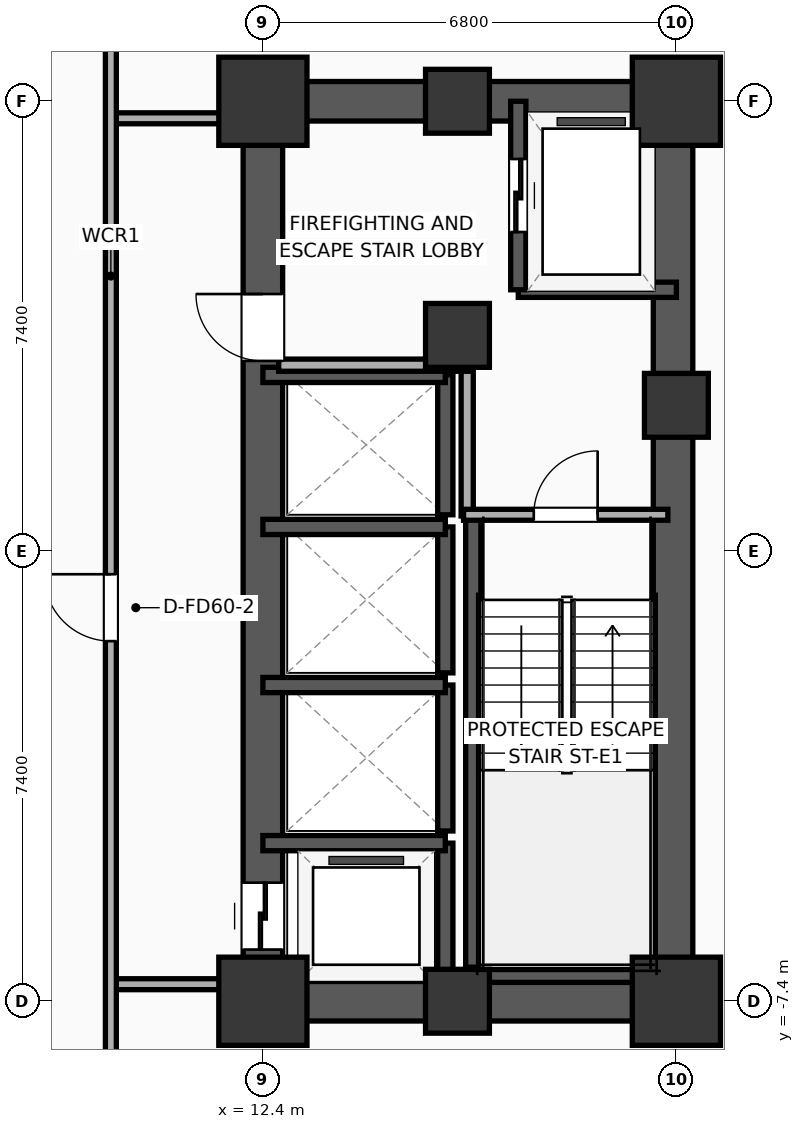
"""IFC4 building model, lengths in metres.
Left out: names, types, materials, properties, quantities, classifications, styles, units other than length and angle.
Written with IfcOpenShell. Run it as: python <this file> out.ifc"""

import sys

from ifc_helpers import new_model, si_unit, direction, frame, frame_2d, origin, origin_2d, place, context, subcontext, project, spatial, rectangle, extrude, element, fill, save


model = new_model("IFC4")
c1 = context("Model", 3, precision=1e-05, world=origin(), true_north=direction((0.0, 1.0)))
c2 = subcontext(c1, "Body", "Model", "MODEL_VIEW")
j1 = project(units=[si_unit("LENGTHUNIT", "METRE"), si_unit("PLANEANGLEUNIT", "RADIAN")], contexts=[c1])
p1 = place(None, origin())
s1 = spatial("IfcSite", under=j1, at=p1, CompositionType="ELEMENT")
p2 = place(p1, origin())
s2 = spatial("IfcBuilding", under=s1, at=p2, CompositionType="ELEMENT")
p3 = place(p2, frame((0.0, 0.0, 29.9)))
s3 = spatial("IfcBuildingStorey", under=s2, at=p3, CompositionType="ELEMENT", Elevation=29.9)
p4 = place(p3, frame((12.4, -7.4, 0.0), z_axis=(0.0, 0.0, 1.0), x_axis=(1.0, 0.0, 0.0)))
e1 = element("IfcColumn", 1, at=p4, inside=s3, PredefinedType="COLUMN", context=c2, shape_type="SweptSolid", body=[
    extrude(rectangle(XDim=1.45, YDim=1.45, at=origin_2d()), origin(), (0.0, 0.0, 1.0), 3.9),
])
p5 = place(p3, frame((15.6, 3.55, 0.0), z_axis=(0.0, 0.0, 1.0), x_axis=(1.0, 0.0, 0.0)))
e2 = element("IfcColumn", 2, at=p5, inside=s3, PredefinedType="COLUMN", context=c2, shape_type="SweptSolid", body=[
    extrude(rectangle(XDim=1.05, YDim=1.05, at=origin_2d()), origin(), (0.0, 0.0, 1.0), 3.9),
])
p6 = place(p3, frame((12.4, 7.4, 0.0), z_axis=(0.0, 0.0, 1.0), x_axis=(1.0, 0.0, 0.0)))
e3 = element("IfcColumn", 3, at=p6, inside=s3, PredefinedType="COLUMN", context=c2, shape_type="SweptSolid", body=[
    extrude(rectangle(XDim=1.45, YDim=1.45, at=origin_2d()), origin(), (0.0, 0.0, 1.0), 3.9),
])
for number, where, z_axis, x_axis in (
    (4, (15.6, -7.4, 0.0), (0.0, 0.0, 1.0), (1.0, 0.0, 0.0)),
    (5, (15.6, 7.4, 0.0), (0.0, 0.0, 1.0), (1.0, 0.0, 0.0)),
):
    element("IfcColumn", number, at=place(p3, frame(where, z_axis=z_axis, x_axis=x_axis)), inside=s3, PredefinedType="COLUMN", context=c2, shape_type="SweptSolid", body=[
        extrude(rectangle(XDim=1.05, YDim=1.05, at=origin_2d()), origin(), (0.0, 0.0, 1.0), 3.9),
    ])
p7 = place(p3, frame((19.2, -7.4, 0.0), z_axis=(0.0, 0.0, 1.0), x_axis=(1.0, 0.0, 0.0)))
e6 = element("IfcColumn", 6, at=p7, inside=s3, PredefinedType="COLUMN", context=c2, shape_type="SweptSolid", body=[
    extrude(rectangle(XDim=1.45, YDim=1.45, at=origin_2d()), origin(), (0.0, 0.0, 1.0), 3.9),
])
p8 = place(p3, frame((19.2, 2.4, 0.0), z_axis=(0.0, 0.0, 1.0), x_axis=(1.0, 0.0, 0.0)))
e7 = element("IfcColumn", 7, at=p8, inside=s3, PredefinedType="COLUMN", context=c2, shape_type="SweptSolid", body=[
    extrude(rectangle(XDim=1.05, YDim=1.05, at=origin_2d()), origin(), (0.0, 0.0, 1.0), 3.9),
])
p9 = place(p3, frame((19.2, 7.4, 0.0), z_axis=(0.0, 0.0, 1.0), x_axis=(1.0, 0.0, 0.0)))
e8 = element("IfcColumn", 8, at=p9, inside=s3, PredefinedType="COLUMN", context=c2, shape_type="SweptSolid", body=[
    extrude(rectangle(XDim=1.45, YDim=1.45, at=origin_2d()), origin(), (0.0, 0.0, 1.0), 3.9),
])
for number, where, z_axis, x_axis in (
    (9, (12.075, -7.4, 0.0), (0.0, 0.0, 1.0), (1.0, 0.0, 0.0)),
    (10, (12.075, 7.4, 0.0), (0.0, 0.0, 1.0), (1.0, 0.0, 0.0)),
):
    element("IfcWall", number, at=place(p3, frame(where, z_axis=z_axis, x_axis=x_axis)), inside=s3, PredefinedType="SHEAR", context=c2, shape_type="SweptSolid", body=[
        extrude(rectangle(XDim=7.45, YDim=0.65, at=frame_2d((3.725, 0.0))), origin(), (0.0, 0.0, 1.0), 3.65),
    ])
p10 = place(p3, frame((12.4, -7.4, 0.0), z_axis=(0.0, 0.0, 1.0), x_axis=(0.0, 1.0, 0.0)))
e11 = element("IfcWall", 11, at=p10, inside=s3, PredefinedType="SHEAR", context=c2, shape_type="SweptSolid", body=[
    extrude(rectangle(XDim=14.8, YDim=0.65, at=frame_2d((7.4, 0.0))), origin(), (0.0, 0.0, 1.0), 3.65),
])
p11 = place(p10, frame((0.85, 0.0, 0.0)))
e12 = element("IfcOpeningElement", 12, at=p11, cuts=e11, PredefinedType="OPENING", context=c2, shape_type="SweptSolid", body=[
    extrude(rectangle(XDim=1.1, YDim=2.05, at=frame_2d((0.55, 1.025))), frame((0.0, 0.335, 0.0), z_axis=(0.0, -1.0, 0.0), x_axis=(1.0, 0.0, 0.0)), (0.0, 0.0, 1.0), 0.67),
])
p12 = place(p10, frame((10.53, 0.0, 0.0)))
e13 = element("IfcOpeningElement", 13, at=p12, cuts=e11, PredefinedType="OPENING", context=c2, shape_type="SweptSolid", body=[
    extrude(rectangle(XDim=1.1, YDim=2.05, at=frame_2d((0.55, 1.025))), frame((0.0, 0.335, 0.0), z_axis=(0.0, -1.0, 0.0), x_axis=(1.0, 0.0, 0.0)), (0.0, 0.0, 1.0), 0.67),
])
p13 = place(p3, frame((19.145, -7.4, 0.0), z_axis=(0.0, 0.0, 1.0), x_axis=(0.0, 1.0, 0.0)))
e14 = element("IfcWall", 14, at=p13, inside=s3, PredefinedType="SHEAR", context=c2, shape_type="SweptSolid", body=[
    extrude(rectangle(XDim=14.8, YDim=0.65, at=frame_2d((7.4, 0.0))), origin(), (0.0, 0.0, 1.0), 3.65),
])
p14 = place(p3, frame((15.86, -7.085, 0.0), z_axis=(0.0, 0.0, 1.0), x_axis=(0.0, 1.0, 0.0)))
e15 = element("IfcWall", 15, at=p14, inside=s3, PredefinedType="SOLIDWALL", context=c2, shape_type="SweptSolid", body=[
    extrude(rectangle(XDim=7.685, YDim=0.25, at=frame_2d((3.843, 0.0))), origin(), (0.0, 0.0, 1.0), 3.65),
])
p15 = place(p3, frame((15.74, -6.965, 0.0), z_axis=(0.0, 0.0, 1.0), x_axis=(1.0, 0.0, 0.0)))
e16 = element("IfcWall", 16, at=p15, inside=s3, PredefinedType="SOLIDWALL", context=c2, shape_type="SweptSolid", body=[
    extrude(rectangle(XDim=3.46, YDim=0.25, at=frame_2d((1.73, 0.0))), origin(), (0.0, 0.0, 1.0), 3.65),
])
p16 = place(p3, frame((16.6, 4.3, 0.0), z_axis=(0.0, 0.0, 1.0), x_axis=(1.0, 0.0, 0.0)))
e17 = element("IfcWall", 17, at=p16, inside=s3, PredefinedType="SOLIDWALL", context=c2, shape_type="SweptSolid", body=[
    extrude(rectangle(XDim=2.6, YDim=0.25, at=frame_2d((1.3, 0.0))), origin(), (0.0, 0.0, 1.0), 3.65),
])
p17 = place(p3, frame((16.6, 7.4, 0.0), z_axis=(0.0, 0.0, 1.0), x_axis=(0.0, -1.0, 0.0)))
e18 = element("IfcWall", 18, at=p17, inside=s3, PredefinedType="SOLIDWALL", context=c2, shape_type="SweptSolid", body=[
    extrude(rectangle(XDim=3.1, YDim=0.25, at=frame_2d((1.55, 0.0))), origin(), (0.0, 0.0, 1.0), 3.65),
])
p18 = place(p17, frame((0.95, 0.0, 0.0)))
e19 = element("IfcOpeningElement", 19, at=p18, cuts=e18, PredefinedType="OPENING", context=c2, shape_type="SweptSolid", body=[
    extrude(rectangle(XDim=1.2, YDim=2.05, at=frame_2d((0.6, 1.025))), frame((0.0, 0.135, 0.0), z_axis=(0.0, -1.0, 0.0), x_axis=(1.0, 0.0, 0.0)), (0.0, 0.0, 1.0), 0.27),
])
p19 = place(p3, frame((15.4, -7.4, 0.0), z_axis=(0.0, 0.0, 1.0), x_axis=(0.0, 1.0, 0.0)))
e20 = element("IfcWall", 20, at=p19, inside=s3, PredefinedType="SOLIDWALL", context=c2, shape_type="SweptSolid", body=[
    extrude(rectangle(XDim=2.6, YDim=0.25, at=frame_2d((1.3, 0.0))), origin(), (0.0, 0.0, 1.0), 3.65),
])
p20 = place(p3, frame((15.4, -4.8, 0.0), z_axis=(0.0, 0.0, 1.0), x_axis=(-1.0, 0.0, 0.0)))
e21 = element("IfcWall", 21, at=p20, inside=s3, PredefinedType="SOLIDWALL", context=c2, shape_type="SweptSolid", body=[
    extrude(rectangle(XDim=3.0, YDim=0.25, at=frame_2d((1.5, 0.0))), origin(), (0.0, 0.0, 1.0), 3.65),
])
p21 = place(p3, frame((15.4, -4.6, 0.0), z_axis=(0.0, 0.0, 1.0), x_axis=(0.0, 1.0, 0.0)))
e22 = element("IfcWall", 22, at=p21, inside=s3, PredefinedType="SOLIDWALL", context=c2, shape_type="SweptSolid", body=[
    extrude(rectangle(XDim=2.4, YDim=0.25, at=frame_2d((1.2, 0.0))), origin(), (0.0, 0.0, 1.0), 3.65),
])
p22 = place(p3, frame((15.4, -2.2, 0.0), z_axis=(0.0, 0.0, 1.0), x_axis=(-1.0, 0.0, 0.0)))
e23 = element("IfcWall", 23, at=p22, inside=s3, PredefinedType="SOLIDWALL", context=c2, shape_type="SweptSolid", body=[
    extrude(rectangle(XDim=3.0, YDim=0.25, at=frame_2d((1.5, 0.0))), origin(), (0.0, 0.0, 1.0), 3.65),
])
p23 = place(p3, frame((15.4, -2.0, 0.0), z_axis=(0.0, 0.0, 1.0), x_axis=(0.0, 1.0, 0.0)))
e24 = element("IfcWall", 24, at=p23, inside=s3, PredefinedType="SOLIDWALL", context=c2, shape_type="SweptSolid", body=[
    extrude(rectangle(XDim=2.4, YDim=0.25, at=frame_2d((1.2, 0.0))), origin(), (0.0, 0.0, 1.0), 3.65),
])
p24 = place(p3, frame((15.4, 0.4, 0.0), z_axis=(0.0, 0.0, 1.0), x_axis=(-1.0, 0.0, 0.0)))
e25 = element("IfcWall", 25, at=p24, inside=s3, PredefinedType="SOLIDWALL", context=c2, shape_type="SweptSolid", body=[
    extrude(rectangle(XDim=3.0, YDim=0.25, at=frame_2d((1.5, 0.0))), origin(), (0.0, 0.0, 1.0), 3.65),
])
p25 = place(p3, frame((15.4, 0.6, 0.0), z_axis=(0.0, 0.0, 1.0), x_axis=(0.0, 1.0, 0.0)))
e26 = element("IfcWall", 26, at=p25, inside=s3, PredefinedType="SOLIDWALL", context=c2, shape_type="SweptSolid", body=[
    extrude(rectangle(XDim=2.3, YDim=0.25, at=frame_2d((1.15, 0.0))), origin(), (0.0, 0.0, 1.0), 3.65),
])
p26 = place(p3, frame((15.4, 2.9, 0.0), z_axis=(0.0, 0.0, 1.0), x_axis=(-1.0, 0.0, 0.0)))
e27 = element("IfcWall", 27, at=p26, inside=s3, PredefinedType="SOLIDWALL", context=c2, shape_type="SweptSolid", body=[
    extrude(rectangle(XDim=3.0, YDim=0.25, at=frame_2d((1.5, 0.0))), origin(), (0.0, 0.0, 1.0), 3.65),
])
p27 = place(p3, frame((15.76, 0.58, 0.0), z_axis=(0.0, 0.0, 1.0), x_axis=(0.0, 1.0, 0.0)))
e28 = element("IfcWall", 28, at=p27, inside=s3, PredefinedType="PARTITIONING", context=c2, shape_type="SweptSolid", body=[
    extrude(rectangle(XDim=2.52, YDim=0.2, at=frame_2d((1.26, 0.0))), origin(), (0.0, 0.0, 1.0), 3.65),
])
p28 = place(p3, frame((12.66, 3.06, 0.0), z_axis=(0.0, 0.0, 1.0), x_axis=(1.0, 0.0, 0.0)))
e29 = element("IfcWall", 29, at=p28, inside=s3, PredefinedType="PARTITIONING", context=c2, shape_type="SweptSolid", body=[
    extrude(rectangle(XDim=3.16, YDim=0.2, at=frame_2d((1.58, 0.0))), origin(), (0.0, 0.0, 1.0), 3.65),
])
p29 = place(p3, frame((15.7, 0.6, 0.0), z_axis=(0.0, 0.0, 1.0), x_axis=(1.0, 0.0, 0.0)))
e30 = element("IfcWall", 30, at=p29, inside=s3, PredefinedType="PARTITIONING", context=c2, shape_type="SweptSolid", body=[
    extrude(rectangle(XDim=3.36, YDim=0.18, at=frame_2d((1.68, 0.0))), origin(), (0.0, 0.0, 1.0), 3.65),
])
p30 = place(p29, frame((1.155, 0.0, 0.0)))
e31 = element("IfcOpeningElement", 31, at=p30, cuts=e30, PredefinedType="OPENING", context=c2, shape_type="SweptSolid", body=[
    extrude(rectangle(XDim=1.05, YDim=2.05, at=frame_2d((0.525, 1.025))), frame((0.0, 0.1, 0.0), z_axis=(0.0, -1.0, 0.0), x_axis=(1.0, 0.0, 0.0)), (0.0, 0.0, 1.0), 0.2),
])
for number, where, z_axis, x_axis in (
    (32, (9.88, 7.12, 0.0), (0.0, 0.0, 1.0), (1.0, 0.0, 0.0)),
    (33, (9.88, -7.12, 0.0), (0.0, 0.0, 1.0), (1.0, 0.0, 0.0)),
):
    element("IfcWall", number, at=place(p3, frame(where, z_axis=z_axis, x_axis=x_axis)), inside=s3, PredefinedType="PARTITIONING", context=c2, shape_type="SweptSolid", body=[
        extrude(rectangle(XDim=2.27, YDim=0.18, at=frame_2d((1.135, 0.0))), origin(), (0.0, 0.0, 1.0), 2.94),
    ])
p31 = place(p3, frame((9.9, -9.28, 0.0), z_axis=(0.0, 0.0, 1.0), x_axis=(0.0, 1.0, 0.0)))
e34 = element("IfcWall", 34, at=p31, inside=s3, PredefinedType="PARTITIONING", context=c2, shape_type="SweptSolid", body=[
    extrude(rectangle(XDim=18.56, YDim=0.18, at=frame_2d((9.28, 0.0))), origin(), (0.0, 0.0, 1.0), 3.65),
])
p32 = place(p31, frame((7.802, 0.0, 0.0)))
e35 = element("IfcOpeningElement", 35, at=p32, cuts=e34, PredefinedType="OPENING", context=c2, shape_type="SweptSolid", body=[
    extrude(rectangle(XDim=1.1, YDim=2.05, at=frame_2d((0.55, 1.025))), frame((0.0, 0.1, 0.0), z_axis=(0.0, -1.0, 0.0), x_axis=(1.0, 0.0, 0.0)), (0.0, 0.0, 1.0), 0.2),
])
p33 = place(p18, origin())
e36 = element("IfcDoor", 36, at=p33, inside=s3, OperationType="SLIDING_TO_LEFT", PredefinedType="DOOR", context=c2, shape_type="SweptSolid", body=[
    extrude(rectangle(XDim=1.2, YDim=2.05, at=frame_2d((0.6, 1.025))), frame((0.0, 0.025, 0.0), z_axis=(0.0, -1.0, 0.0), x_axis=(1.0, 0.0, 0.0)), (0.0, 0.0, 1.0), 0.05),
])
fill(e19, e36)
p34 = place(p11, origin())
e37 = element("IfcDoor", 37, at=p34, inside=s3, OperationType="SLIDING_TO_LEFT", PredefinedType="DOOR", context=c2, shape_type="SweptSolid", body=[
    extrude(rectangle(XDim=1.1, YDim=2.05, at=frame_2d((0.55, 1.025))), frame((0.0, 0.025, 0.0), z_axis=(0.0, -1.0, 0.0), x_axis=(1.0, 0.0, 0.0)), (0.0, 0.0, 1.0), 0.05),
])
fill(e12, e37)
p35 = place(p30, origin())
e38 = element("IfcDoor", 38, at=p35, inside=s3, OperationType="SINGLE_SWING_RIGHT", PredefinedType="DOOR", context=c2, shape_type="SweptSolid", body=[
    extrude(rectangle(XDim=1.05, YDim=2.05, at=frame_2d((0.525, 1.025))), frame((0.0, 0.025, 0.0), z_axis=(0.0, -1.0, 0.0), x_axis=(1.0, 0.0, 0.0)), (0.0, 0.0, 1.0), 0.05),
])
fill(e31, e38)
p36 = place(p32, origin())
e39 = element("IfcDoor", 39, at=p36, inside=s3, OperationType="SINGLE_SWING_RIGHT", PredefinedType="DOOR", context=c2, shape_type="SweptSolid", body=[
    extrude(rectangle(XDim=1.1, YDim=2.05, at=frame_2d((0.55, 1.025))), frame((0.0, 0.025, 0.0), z_axis=(0.0, -1.0, 0.0), x_axis=(1.0, 0.0, 0.0)), (0.0, 0.0, 1.0), 0.05),
])
fill(e35, e39)
p37 = place(p12, origin())
e40 = element("IfcDoor", 40, at=p37, inside=s3, OperationType="SINGLE_SWING_RIGHT", PredefinedType="DOOR", context=c2, shape_type="SweptSolid", body=[
    extrude(rectangle(XDim=1.1, YDim=2.05, at=frame_2d((0.55, 1.025))), frame((0.0, 0.025, 0.0), z_axis=(0.0, -1.0, 0.0), x_axis=(1.0, 0.0, 0.0)), (0.0, 0.0, 1.0), 0.05),
])
fill(e13, e40)
save(model, sys.argv[1])
